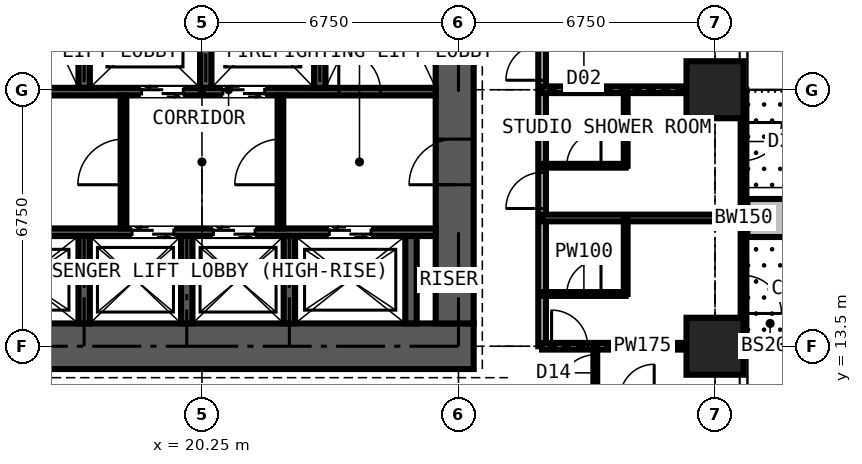
"""IFC4 building model, lengths in metres.
Left out: names, types, materials, properties, quantities, classifications, styles, units other than length and angle.
Written with IfcOpenShell. Run it as: python <this file> out.ifc"""

import sys

from ifc_helpers import new_model, si_unit, direction, frame, frame_2d, origin, origin_2d, place, context, subcontext, project, spatial, rectangle, extrude, element, fill, save


model = new_model("IFC4")
c1 = context("Model", 3, precision=1e-05, world=origin(), true_north=direction((0.0, 1.0)))
c2 = subcontext(c1, "Body", "Model", "MODEL_VIEW")
j1 = project(units=[si_unit("LENGTHUNIT", "METRE"), si_unit("PLANEANGLEUNIT", "RADIAN")], contexts=[c1])
p1 = place(None, origin())
s1 = spatial("IfcSite", under=j1, at=p1, CompositionType="ELEMENT")
p2 = place(p1, origin())
s2 = spatial("IfcBuilding", under=s1, at=p2, CompositionType="ELEMENT")
p3 = place(p2, frame((0.0, 0.0, 163.8)))
s3 = spatial("IfcBuildingStorey", under=s2, at=p3, CompositionType="ELEMENT", Elevation=163.8)
for number, where, z_axis, x_axis in (
    (1, (33.75, 13.5, 0.0), (0.0, 0.0, 1.0), (1.0, 0.0, 0.0)),
    (2, (33.75, 20.25, 0.0), (0.0, 0.0, 1.0), (1.0, 0.0, 0.0)),
):
    element("IfcColumn", number, at=place(p3, frame(where, z_axis=z_axis, x_axis=x_axis)), inside=s3, PredefinedType="COLUMN", context=c2, shape_type="SweptSolid", body=[
        extrude(rectangle(XDim=1.5, YDim=1.5, at=origin_2d()), origin(), (0.0, 0.0, 1.0), 3.6),
    ])
p4 = place(p3, frame((13.1, 13.5, 0.0), z_axis=(0.0, 0.0, 1.0), x_axis=(1.0, 0.0, 0.0)))
e3 = element("IfcWall", 3, at=p4, inside=s3, PredefinedType="SHEAR", context=c2, shape_type="SweptSolid", body=[
    extrude(rectangle(XDim=14.3, YDim=1.2, at=frame_2d((7.15, 0.0))), origin(), (0.0, 0.0, 1.0), 3.6),
])
p5 = place(p3, frame((26.9, 14.1, 0.0), z_axis=(0.0, 0.0, 1.0), x_axis=(0.0, 1.0, 0.0)))
e4 = element("IfcWall", 4, at=p5, inside=s3, PredefinedType="SHEAR", context=c2, shape_type="SweptSolid", body=[
    extrude(rectangle(XDim=12.3, YDim=1.0, at=frame_2d((6.15, 0.0))), origin(), (0.0, 0.0, 1.0), 3.6),
])
p6 = place(p5, frame((3.65, 0.0, 0.0)))
e5 = element("IfcOpeningElement", 5, at=p6, cuts=e4, PredefinedType="OPENING", context=c2, shape_type="SweptSolid", body=[
    extrude(rectangle(XDim=1.2, YDim=2.2, at=frame_2d((0.6, 1.1))), frame((0.0, 0.51, 0.0), z_axis=(0.0, -1.0, 0.0), x_axis=(1.0, 0.0, 0.0)), (0.0, 0.0, 1.0), 1.02),
])
p7 = place(p3, frame((34.5, 20.25, 0.0), z_axis=(0.0, 0.0, 1.0), x_axis=(0.0, -1.0, 0.0)))
e6 = element("IfcWall", 6, at=p7, inside=s3, PredefinedType="SOLIDWALL", context=c2, shape_type="SweptSolid", body=[
    extrude(rectangle(XDim=6.75, YDim=0.15, at=frame_2d((3.375, 0.0))), origin(), (0.0, 0.0, 1.0), 3.375),
])
p8 = place(p7, frame((0.863, 0.0, 0.0)))
e7 = element("IfcOpeningElement", 7, at=p8, cuts=e6, PredefinedType="OPENING", context=c2, shape_type="SweptSolid", body=[
    extrude(rectangle(XDim=1.0, YDim=2.2, at=frame_2d((0.5, 1.1))), frame((0.0, 0.085, 0.0), z_axis=(0.0, -1.0, 0.0), x_axis=(1.0, 0.0, 0.0)), (0.0, 0.0, 1.0), 0.17),
])
p9 = place(p7, frame((1.975, 0.0, 0.9)))
e8 = element("IfcOpeningElement", 8, at=p9, cuts=e6, PredefinedType="OPENING", context=c2, shape_type="SweptSolid", body=[
    extrude(rectangle(XDim=1.2, YDim=1.8, at=frame_2d((0.6, 0.9))), frame((0.0, 0.085, 0.0), z_axis=(0.0, -1.0, 0.0), x_axis=(1.0, 0.0, 0.0)), (0.0, 0.0, 1.0), 0.17),
])
p10 = place(p7, frame((4.887, 0.0, 0.0)))
e9 = element("IfcOpeningElement", 9, at=p10, cuts=e6, PredefinedType="OPENING", context=c2, shape_type="SweptSolid", body=[
    extrude(rectangle(XDim=1.0, YDim=2.2, at=frame_2d((0.5, 1.1))), frame((0.0, 0.085, 0.0), z_axis=(0.0, -1.0, 0.0), x_axis=(1.0, 0.0, 0.0)), (0.0, 0.0, 1.0), 0.17),
])
p11 = place(p7, frame((3.575, 0.0, 0.9)))
e10 = element("IfcOpeningElement", 10, at=p11, cuts=e6, PredefinedType="OPENING", context=c2, shape_type="SweptSolid", body=[
    extrude(rectangle(XDim=1.2, YDim=1.8, at=frame_2d((0.6, 0.9))), frame((0.0, 0.085, 0.0), z_axis=(0.0, -1.0, 0.0), x_axis=(1.0, 0.0, 0.0)), (0.0, 0.0, 1.0), 0.17),
])
p12 = place(p3, frame((34.6, 16.875, 0.0), z_axis=(0.0, 0.0, 1.0), x_axis=(1.0, 0.0, 0.0)))
e11 = element("IfcWall", 11, at=p12, inside=s3, PredefinedType="USERDEFINED", context=c2, shape_type="SweptSolid", body=[
    extrude(rectangle(XDim=2.2, YDim=1.0, at=frame_2d((1.1, 0.0))), origin(), (0.0, 0.0, 1.0), 0.9),
])
p13 = place(p3, frame((14.1, 16.5, 0.0), z_axis=(0.0, 0.0, 1.0), x_axis=(1.0, 0.0, 0.0)))
e12 = element("IfcWall", 12, at=p13, inside=s3, PredefinedType="SHEAR", context=c2, shape_type="SweptSolid", body=[
    extrude(rectangle(XDim=12.3, YDim=0.2, at=frame_2d((6.15, 0.0))), origin(), (0.0, 0.0, 1.0), 3.6),
])
p14 = place(p13, frame((0.9, 0.0, 0.0)))
e13 = element("IfcOpeningElement", 13, at=p14, cuts=e12, PredefinedType="OPENING", context=c2, shape_type="SweptSolid", body=[
    extrude(rectangle(XDim=1.1, YDim=2.2, at=frame_2d((0.55, 1.1))), frame((0.0, 0.11, 0.0), z_axis=(0.0, -1.0, 0.0), x_axis=(1.0, 0.0, 0.0)), (0.0, 0.0, 1.0), 0.22),
])
p15 = place(p13, frame((4.31, 0.0, 0.0)))
e14 = element("IfcOpeningElement", 14, at=p15, cuts=e12, PredefinedType="OPENING", context=c2, shape_type="SweptSolid", body=[
    extrude(rectangle(XDim=1.1, YDim=2.2, at=frame_2d((0.55, 1.1))), frame((0.0, 0.11, 0.0), z_axis=(0.0, -1.0, 0.0), x_axis=(1.0, 0.0, 0.0)), (0.0, 0.0, 1.0), 0.22),
])
p16 = place(p13, frame((6.45, 0.0, 0.0)))
e15 = element("IfcOpeningElement", 15, at=p16, cuts=e12, PredefinedType="OPENING", context=c2, shape_type="SweptSolid", body=[
    extrude(rectangle(XDim=1.1, YDim=2.2, at=frame_2d((0.55, 1.1))), frame((0.0, 0.11, 0.0), z_axis=(0.0, -1.0, 0.0), x_axis=(1.0, 0.0, 0.0)), (0.0, 0.0, 1.0), 0.22),
])
p17 = place(p13, frame((9.5, 0.0, 0.0)))
e16 = element("IfcOpeningElement", 16, at=p17, cuts=e12, PredefinedType="OPENING", context=c2, shape_type="SweptSolid", body=[
    extrude(rectangle(XDim=1.1, YDim=2.2, at=frame_2d((0.55, 1.1))), frame((0.0, 0.11, 0.0), z_axis=(0.0, -1.0, 0.0), x_axis=(1.0, 0.0, 0.0)), (0.0, 0.0, 1.0), 0.22),
])
p18 = place(p3, frame((14.1, 20.2, 0.0), z_axis=(0.0, 0.0, 1.0), x_axis=(1.0, 0.0, 0.0)))
e17 = element("IfcWall", 17, at=p18, inside=s3, PredefinedType="SHEAR", context=c2, shape_type="SweptSolid", body=[
    extrude(rectangle(XDim=12.3, YDim=0.2, at=frame_2d((6.15, 0.0))), origin(), (0.0, 0.0, 1.0), 3.6),
])
p19 = place(p18, frame((4.56, 0.0, 0.0)))
e18 = element("IfcOpeningElement", 18, at=p19, cuts=e17, PredefinedType="OPENING", context=c2, shape_type="SweptSolid", body=[
    extrude(rectangle(XDim=1.1, YDim=2.2, at=frame_2d((0.55, 1.1))), frame((0.0, 0.11, 0.0), z_axis=(0.0, -1.0, 0.0), x_axis=(1.0, 0.0, 0.0)), (0.0, 0.0, 1.0), 0.22),
])
p20 = place(p18, frame((6.7, 0.0, 0.0)))
e19 = element("IfcOpeningElement", 19, at=p20, cuts=e17, PredefinedType="OPENING", context=c2, shape_type="SweptSolid", body=[
    extrude(rectangle(XDim=1.1, YDim=2.2, at=frame_2d((0.55, 1.1))), frame((0.0, 0.11, 0.0), z_axis=(0.0, -1.0, 0.0), x_axis=(1.0, 0.0, 0.0)), (0.0, 0.0, 1.0), 0.22),
])
p21 = place(p18, frame((0.35, 0.0, 0.0)))
e20 = element("IfcOpeningElement", 20, at=p21, cuts=e17, PredefinedType="OPENING", context=c2, shape_type="SweptSolid", body=[
    extrude(rectangle(XDim=1.1, YDim=2.2, at=frame_2d((0.55, 1.1))), frame((0.0, 0.11, 0.0), z_axis=(0.0, -1.0, 0.0), x_axis=(1.0, 0.0, 0.0)), (0.0, 0.0, 1.0), 0.22),
])
p22 = place(p18, frame((9.75, 0.0, 0.0)))
e21 = element("IfcOpeningElement", 21, at=p22, cuts=e17, PredefinedType="OPENING", context=c2, shape_type="SweptSolid", body=[
    extrude(rectangle(XDim=1.1, YDim=2.2, at=frame_2d((0.55, 1.1))), frame((0.0, 0.11, 0.0), z_axis=(0.0, -1.0, 0.0), x_axis=(1.0, 0.0, 0.0)), (0.0, 0.0, 1.0), 0.22),
])
for number, where, z_axis, x_axis in (
    (22, (17.15, 20.3, 0.0), (0.0, 0.0, 1.0), (0.0, 1.0, 0.0)),
    (23, (23.35, 20.3, 0.0), (0.0, 0.0, 1.0), (0.0, 1.0, 0.0)),
):
    element("IfcWall", number, at=place(p3, frame(where, z_axis=z_axis, x_axis=x_axis)), inside=s3, PredefinedType="SHEAR", context=c2, shape_type="SweptSolid", body=[
        extrude(rectangle(XDim=6.1, YDim=0.3, at=frame_2d((3.05, 0.0))), origin(), (0.0, 0.0, 1.0), 3.6),
    ])
p23 = place(p3, frame((20.35, 20.3, 0.0), z_axis=(0.0, 0.0, 1.0), x_axis=(0.0, 1.0, 0.0)))
e24 = element("IfcWall", 24, at=p23, inside=s3, PredefinedType="SHEAR", context=c2, shape_type="SweptSolid", body=[
    extrude(rectangle(XDim=2.8, YDim=0.3, at=frame_2d((1.4, 0.0))), origin(), (0.0, 0.0, 1.0), 3.6),
])
for number, where, z_axis, x_axis in (
    (25, (17.15, 14.1, 0.0), (0.0, 0.0, 1.0), (0.0, 1.0, 0.0)),
    (26, (19.85, 14.1, 0.0), (0.0, 0.0, 1.0), (0.0, 1.0, 0.0)),
    (27, (22.55, 14.1, 0.0), (0.0, 0.0, 1.0), (0.0, 1.0, 0.0)),
    (28, (25.75, 14.1, 0.0), (0.0, 0.0, 1.0), (0.0, 1.0, 0.0)),
):
    element("IfcWall", number, at=place(p3, frame(where, z_axis=z_axis, x_axis=x_axis)), inside=s3, PredefinedType="SHEAR", context=c2, shape_type="SweptSolid", body=[
        extrude(rectangle(XDim=2.3, YDim=0.3, at=frame_2d((1.15, 0.0))), origin(), (0.0, 0.0, 1.0), 3.6),
    ])
p24 = place(p3, frame((18.185, 16.6, 0.0), z_axis=(0.0, 0.0, 1.0), x_axis=(0.0, 1.0, 0.0)))
e29 = element("IfcWall", 29, at=p24, inside=s3, PredefinedType="PARTITIONING", context=c2, shape_type="SweptSolid", body=[
    extrude(rectangle(XDim=3.5, YDim=0.15, at=frame_2d((1.75, 0.0))), origin(), (0.0, 0.0, 1.0), 3.375),
])
p25 = place(p24, frame((1.15, 0.0, 0.0)))
e30 = element("IfcOpeningElement", 30, at=p25, cuts=e29, PredefinedType="OPENING", context=c2, shape_type="SweptSolid", body=[
    extrude(rectangle(XDim=1.2, YDim=2.2, at=frame_2d((0.6, 1.1))), frame((0.0, 0.085, 0.0), z_axis=(0.0, -1.0, 0.0), x_axis=(1.0, 0.0, 0.0)), (0.0, 0.0, 1.0), 0.17),
])
p26 = place(p3, frame((22.315, 16.6, 0.0), z_axis=(0.0, 0.0, 1.0), x_axis=(0.0, 1.0, 0.0)))
e31 = element("IfcWall", 31, at=p26, inside=s3, PredefinedType="PARTITIONING", context=c2, shape_type="SweptSolid", body=[
    extrude(rectangle(XDim=3.5, YDim=0.15, at=frame_2d((1.75, 0.0))), origin(), (0.0, 0.0, 1.0), 3.375),
])
p27 = place(p26, frame((1.15, 0.0, 0.0)))
e32 = element("IfcOpeningElement", 32, at=p27, cuts=e31, PredefinedType="OPENING", context=c2, shape_type="SweptSolid", body=[
    extrude(rectangle(XDim=1.2, YDim=2.2, at=frame_2d((0.6, 1.1))), frame((0.0, 0.085, 0.0), z_axis=(0.0, -1.0, 0.0), x_axis=(1.0, 0.0, 0.0)), (0.0, 0.0, 1.0), 0.17),
])
p28 = place(p3, frame((29.2, 13.5, 0.0), z_axis=(0.0, 0.0, 1.0), x_axis=(0.0, 1.0, 0.0)))
e33 = element("IfcWall", 33, at=p28, inside=s3, PredefinedType="PARTITIONING", context=c2, shape_type="SweptSolid", body=[
    extrude(rectangle(XDim=15.7, YDim=0.2, at=frame_2d((7.85, 0.0))), origin(), (0.0, 0.0, 1.0), 3.375),
])
p29 = place(p28, frame((3.625, 0.0, 0.0)))
e34 = element("IfcOpeningElement", 34, at=p29, cuts=e33, PredefinedType="OPENING", context=c2, shape_type="SweptSolid", body=[
    extrude(rectangle(XDim=0.95, YDim=2.2, at=frame_2d((0.475, 1.1))), frame((0.0, 0.11, 0.0), z_axis=(0.0, -1.0, 0.0), x_axis=(1.0, 0.0, 0.0)), (0.0, 0.0, 1.0), 0.22),
])
p30 = place(p28, frame((7.0, 0.0, 0.0)))
e35 = element("IfcOpeningElement", 35, at=p30, cuts=e33, PredefinedType="OPENING", context=c2, shape_type="SweptSolid", body=[
    extrude(rectangle(XDim=0.95, YDim=2.2, at=frame_2d((0.475, 1.1))), frame((0.0, 0.11, 0.0), z_axis=(0.0, -1.0, 0.0), x_axis=(1.0, 0.0, 0.0)), (0.0, 0.0, 1.0), 0.22),
])
p31 = place(p28, frame((10.375, 0.0, 0.0)))
e36 = element("IfcOpeningElement", 36, at=p31, cuts=e33, PredefinedType="OPENING", context=c2, shape_type="SweptSolid", body=[
    extrude(rectangle(XDim=0.95, YDim=2.2, at=frame_2d((0.475, 1.1))), frame((0.0, 0.11, 0.0), z_axis=(0.0, -1.0, 0.0), x_axis=(1.0, 0.0, 0.0)), (0.0, 0.0, 1.0), 0.22),
])
p32 = place(p28, frame((14.1, 0.0, 0.0)))
e37 = element("IfcOpeningElement", 37, at=p32, cuts=e33, PredefinedType="OPENING", context=c2, shape_type="SweptSolid", body=[
    extrude(rectangle(XDim=1.0, YDim=2.2, at=frame_2d((0.5, 1.1))), frame((0.0, 0.11, 0.0), z_axis=(0.0, -1.0, 0.0), x_axis=(1.0, 0.0, 0.0)), (0.0, 0.0, 1.0), 0.22),
])
p33 = place(p3, frame((29.2, 13.5, 0.0), z_axis=(0.0, 0.0, 1.0), x_axis=(1.0, 0.0, 0.0)))
e38 = element("IfcWall", 38, at=p33, inside=s3, PredefinedType="PARTITIONING", context=c2, shape_type="SweptSolid", body=[
    extrude(rectangle(XDim=5.284, YDim=0.175, at=frame_2d((2.642, 0.0))), origin(), (0.0, 0.0, 1.0), 2.806),
])
p34 = place(p33, frame((0.25, 0.0, 0.0)))
e39 = element("IfcOpeningElement", 39, at=p34, cuts=e38, PredefinedType="OPENING", context=c2, shape_type="SweptSolid", body=[
    extrude(rectangle(XDim=0.95, YDim=2.2, at=frame_2d((0.475, 1.1))), frame((0.0, 0.097, 0.0), z_axis=(0.0, -1.0, 0.0), x_axis=(1.0, 0.0, 0.0)), (0.0, 0.0, 1.0), 0.195),
])
p35 = place(p3, frame((29.2, 14.875, 0.0), z_axis=(0.0, 0.0, 1.0), x_axis=(1.0, 0.0, 0.0)))
e40 = element("IfcWall", 40, at=p35, inside=s3, PredefinedType="PARTITIONING", context=c2, shape_type="SweptSolid", body=[
    extrude(rectangle(XDim=2.2, YDim=0.1, at=frame_2d((1.1, 0.0))), origin(), (0.0, 0.0, 1.0), 3.375),
])
p36 = place(p35, frame((0.65, 0.0, 0.0)))
e41 = element("IfcOpeningElement", 41, at=p36, cuts=e40, PredefinedType="OPENING", context=c2, shape_type="SweptSolid", body=[
    extrude(rectangle(XDim=0.9, YDim=2.2, at=frame_2d((0.45, 1.1))), frame((0.0, 0.06, 0.0), z_axis=(0.0, -1.0, 0.0), x_axis=(1.0, 0.0, 0.0)), (0.0, 0.0, 1.0), 0.12),
])
p37 = place(p3, frame((29.2, 16.875, 0.0), z_axis=(0.0, 0.0, 1.0), x_axis=(1.0, 0.0, 0.0)))
e42 = element("IfcWall", 42, at=p37, inside=s3, PredefinedType="PARTITIONING", context=c2, shape_type="SweptSolid", body=[
    extrude(rectangle(XDim=5.284, YDim=0.175, at=frame_2d((2.642, 0.0))), origin(), (0.0, 0.0, 1.0), 3.375),
])
p38 = place(p3, frame((29.2, 18.25, 0.0), z_axis=(0.0, 0.0, 1.0), x_axis=(1.0, 0.0, 0.0)))
e43 = element("IfcWall", 43, at=p38, inside=s3, PredefinedType="PARTITIONING", context=c2, shape_type="SweptSolid", body=[
    extrude(rectangle(XDim=2.2, YDim=0.1, at=frame_2d((1.1, 0.0))), origin(), (0.0, 0.0, 1.0), 3.375),
])
p39 = place(p38, frame((0.65, 0.0, 0.0)))
e44 = element("IfcOpeningElement", 44, at=p39, cuts=e43, PredefinedType="OPENING", context=c2, shape_type="SweptSolid", body=[
    extrude(rectangle(XDim=0.9, YDim=2.2, at=frame_2d((0.45, 1.1))), frame((0.0, 0.06, 0.0), z_axis=(0.0, -1.0, 0.0), x_axis=(1.0, 0.0, 0.0)), (0.0, 0.0, 1.0), 0.12),
])
p40 = place(p3, frame((29.2, 20.25, 0.0), z_axis=(0.0, 0.0, 1.0), x_axis=(1.0, 0.0, 0.0)))
e45 = element("IfcWall", 45, at=p40, inside=s3, PredefinedType="PARTITIONING", context=c2, shape_type="SweptSolid", body=[
    extrude(rectangle(XDim=5.284, YDim=0.175, at=frame_2d((2.642, 0.0))), origin(), (0.0, 0.0, 1.0), 2.806),
])
p41 = place(p3, frame((30.6, 10.125, 0.0), z_axis=(0.0, 0.0, 1.0), x_axis=(0.0, 1.0, 0.0)))
e46 = element("IfcWall", 46, at=p41, inside=s3, PredefinedType="PARTITIONING", context=c2, shape_type="SweptSolid", body=[
    extrude(rectangle(XDim=3.375, YDim=0.1, at=frame_2d((1.688, 0.0))), origin(), (0.0, 0.0, 1.0), 3.375),
])
p42 = place(p41, frame((2.2, 0.0, 0.0)))
e47 = element("IfcOpeningElement", 47, at=p42, cuts=e46, PredefinedType="OPENING", context=c2, shape_type="SweptSolid", body=[
    extrude(rectangle(XDim=0.95, YDim=2.2, at=frame_2d((0.475, 1.1))), frame((0.0, 0.06, 0.0), z_axis=(0.0, -1.0, 0.0), x_axis=(1.0, 0.0, 0.0)), (0.0, 0.0, 1.0), 0.12),
])
for number, where, z_axis, x_axis in (
    (48, (31.4, 14.875, 0.0), (0.0, 0.0, 1.0), (0.0, 1.0, 0.0)),
    (49, (31.4, 18.25, 0.0), (0.0, 0.0, 1.0), (0.0, 1.0, 0.0)),
):
    element("IfcWall", number, at=place(p3, frame(where, z_axis=z_axis, x_axis=x_axis)), inside=s3, PredefinedType="PARTITIONING", context=c2, shape_type="SweptSolid", body=[
        extrude(rectangle(XDim=2.0, YDim=0.1, at=frame_2d((1.0, 0.0))), origin(), (0.0, 0.0, 1.0), 3.375),
    ])
p43 = place(p8, origin())
e50 = element("IfcDoor", 50, at=p43, inside=s3, OperationType="SINGLE_SWING_LEFT", PredefinedType="DOOR", context=c2, shape_type="SweptSolid", body=[
    extrude(rectangle(XDim=1.0, YDim=2.2, at=frame_2d((0.5, 1.1))), frame((0.0, 0.025, 0.0), z_axis=(0.0, -1.0, 0.0), x_axis=(1.0, 0.0, 0.0)), (0.0, 0.0, 1.0), 0.05),
])
fill(e7, e50)
p44 = place(p9, origin())
e51 = element("IfcWindow", 51, at=p44, inside=s3, PartitioningType="SINGLE_PANEL", PredefinedType="WINDOW", context=c2, shape_type="SweptSolid", body=[
    extrude(rectangle(XDim=1.2, YDim=1.8, at=frame_2d((0.6, 0.9))), frame((0.0, 0.03, 0.0), z_axis=(0.0, -1.0, 0.0), x_axis=(1.0, 0.0, 0.0)), (0.0, 0.0, 1.0), 0.06),
])
fill(e8, e51)
p45 = place(p10, origin())
e52 = element("IfcDoor", 52, at=p45, inside=s3, OperationType="SINGLE_SWING_RIGHT", PredefinedType="DOOR", context=c2, shape_type="SweptSolid", body=[
    extrude(rectangle(XDim=1.0, YDim=2.2, at=frame_2d((0.5, 1.1))), frame((0.0, 0.025, 0.0), z_axis=(0.0, -1.0, 0.0), x_axis=(1.0, 0.0, 0.0)), (0.0, 0.0, 1.0), 0.05),
])
fill(e9, e52)
p46 = place(p11, origin())
e53 = element("IfcWindow", 53, at=p46, inside=s3, PartitioningType="SINGLE_PANEL", PredefinedType="WINDOW", context=c2, shape_type="SweptSolid", body=[
    extrude(rectangle(XDim=1.2, YDim=1.8, at=frame_2d((0.6, 0.9))), frame((0.0, 0.03, 0.0), z_axis=(0.0, -1.0, 0.0), x_axis=(1.0, 0.0, 0.0)), (0.0, 0.0, 1.0), 0.06),
])
fill(e10, e53)
p47 = place(p15, origin())
e54 = element("IfcDoor", 54, at=p47, inside=s3, OperationType="DOUBLE_DOOR_SLIDING", PredefinedType="DOOR", context=c2, shape_type="SweptSolid", body=[
    extrude(rectangle(XDim=1.1, YDim=2.2, at=frame_2d((0.55, 1.1))), frame((0.0, 0.025, 0.0), z_axis=(0.0, -1.0, 0.0), x_axis=(1.0, 0.0, 0.0)), (0.0, 0.0, 1.0), 0.05),
])
fill(e14, e54)
p48 = place(p16, origin())
e55 = element("IfcDoor", 55, at=p48, inside=s3, OperationType="DOUBLE_DOOR_SLIDING", PredefinedType="DOOR", context=c2, shape_type="SweptSolid", body=[
    extrude(rectangle(XDim=1.1, YDim=2.2, at=frame_2d((0.55, 1.1))), frame((0.0, 0.025, 0.0), z_axis=(0.0, -1.0, 0.0), x_axis=(1.0, 0.0, 0.0)), (0.0, 0.0, 1.0), 0.05),
])
fill(e15, e55)
p49 = place(p17, origin())
e56 = element("IfcDoor", 56, at=p49, inside=s3, OperationType="DOUBLE_DOOR_SLIDING", PredefinedType="DOOR", context=c2, shape_type="SweptSolid", body=[
    extrude(rectangle(XDim=1.1, YDim=2.2, at=frame_2d((0.55, 1.1))), frame((0.0, 0.025, 0.0), z_axis=(0.0, -1.0, 0.0), x_axis=(1.0, 0.0, 0.0)), (0.0, 0.0, 1.0), 0.05),
])
fill(e16, e56)
p50 = place(p19, origin())
e57 = element("IfcDoor", 57, at=p50, inside=s3, OperationType="DOUBLE_DOOR_SLIDING", PredefinedType="DOOR", context=c2, shape_type="SweptSolid", body=[
    extrude(rectangle(XDim=1.1, YDim=2.2, at=frame_2d((0.55, 1.1))), frame((0.0, 0.025, 0.0), z_axis=(0.0, -1.0, 0.0), x_axis=(1.0, 0.0, 0.0)), (0.0, 0.0, 1.0), 0.05),
])
fill(e18, e57)
p51 = place(p20, origin())
e58 = element("IfcDoor", 58, at=p51, inside=s3, OperationType="DOUBLE_DOOR_SLIDING", PredefinedType="DOOR", context=c2, shape_type="SweptSolid", body=[
    extrude(rectangle(XDim=1.1, YDim=2.2, at=frame_2d((0.55, 1.1))), frame((0.0, 0.025, 0.0), z_axis=(0.0, -1.0, 0.0), x_axis=(1.0, 0.0, 0.0)), (0.0, 0.0, 1.0), 0.05),
])
fill(e19, e58)
p52 = place(p6, origin())
e59 = element("IfcDoor", 59, at=p52, inside=s3, OperationType="DOUBLE_DOOR_SINGLE_SWING", PredefinedType="DOOR", context=c2, shape_type="SweptSolid", body=[
    extrude(rectangle(XDim=1.2, YDim=2.2, at=frame_2d((0.6, 1.1))), frame((0.0, 0.025, 0.0), z_axis=(0.0, -1.0, 0.0), x_axis=(1.0, 0.0, 0.0)), (0.0, 0.0, 1.0), 0.05),
])
fill(e5, e59)
p53 = place(p25, origin())
e60 = element("IfcDoor", 60, at=p53, inside=s3, OperationType="DOUBLE_DOOR_SINGLE_SWING", PredefinedType="DOOR", context=c2, shape_type="SweptSolid", body=[
    extrude(rectangle(XDim=1.2, YDim=2.2, at=frame_2d((0.6, 1.1))), frame((0.0, 0.025, 0.0), z_axis=(0.0, -1.0, 0.0), x_axis=(1.0, 0.0, 0.0)), (0.0, 0.0, 1.0), 0.05),
])
fill(e30, e60)
p54 = place(p27, origin())
e61 = element("IfcDoor", 61, at=p54, inside=s3, OperationType="DOUBLE_DOOR_SINGLE_SWING", PredefinedType="DOOR", context=c2, shape_type="SweptSolid", body=[
    extrude(rectangle(XDim=1.2, YDim=2.2, at=frame_2d((0.6, 1.1))), frame((0.0, 0.025, 0.0), z_axis=(0.0, -1.0, 0.0), x_axis=(1.0, 0.0, 0.0)), (0.0, 0.0, 1.0), 0.05),
])
fill(e32, e61)
p55 = place(p22, origin())
e62 = element("IfcDoor", 62, at=p55, inside=s3, OperationType="SINGLE_SWING_LEFT", PredefinedType="DOOR", context=c2, shape_type="SweptSolid", body=[
    extrude(rectangle(XDim=1.1, YDim=2.2, at=frame_2d((0.55, 1.1))), frame((0.0, 0.025, 0.0), z_axis=(0.0, -1.0, 0.0), x_axis=(1.0, 0.0, 0.0)), (0.0, 0.0, 1.0), 0.05),
])
fill(e21, e62)
p56 = place(p42, origin())
e63 = element("IfcDoor", 63, at=p56, inside=s3, OperationType="SINGLE_SWING_LEFT", PredefinedType="DOOR", context=c2, shape_type="SweptSolid", body=[
    extrude(rectangle(XDim=0.95, YDim=2.2, at=frame_2d((0.475, 1.1))), frame((0.0, 0.025, 0.0), z_axis=(0.0, -1.0, 0.0), x_axis=(1.0, 0.0, 0.0)), (0.0, 0.0, 1.0), 0.05),
])
fill(e47, e63)
p57 = place(p34, origin())
e64 = element("IfcDoor", 64, at=p57, inside=s3, OperationType="SINGLE_SWING_LEFT", PredefinedType="DOOR", context=c2, shape_type="SweptSolid", body=[
    extrude(rectangle(XDim=0.95, YDim=2.2, at=frame_2d((0.475, 1.1))), frame((0.0, 0.025, 0.0), z_axis=(0.0, -1.0, 0.0), x_axis=(1.0, 0.0, 0.0)), (0.0, 0.0, 1.0), 0.05),
])
fill(e39, e64)
p58 = place(p36, origin())
e65 = element("IfcDoor", 65, at=p58, inside=s3, OperationType="SINGLE_SWING_RIGHT", PredefinedType="DOOR", context=c2, shape_type="SweptSolid", body=[
    extrude(rectangle(XDim=0.9, YDim=2.2, at=frame_2d((0.45, 1.1))), frame((0.0, 0.025, 0.0), z_axis=(0.0, -1.0, 0.0), x_axis=(1.0, 0.0, 0.0)), (0.0, 0.0, 1.0), 0.05),
])
fill(e41, e65)
p59 = place(p29, origin())
e66 = element("IfcDoor", 66, at=p59, inside=s3, OperationType="SINGLE_SWING_LEFT", PredefinedType="DOOR", context=c2, shape_type="SweptSolid", body=[
    extrude(rectangle(XDim=0.95, YDim=2.2, at=frame_2d((0.475, 1.1))), frame((0.0, 0.025, 0.0), z_axis=(0.0, -1.0, 0.0), x_axis=(1.0, 0.0, 0.0)), (0.0, 0.0, 1.0), 0.05),
])
fill(e34, e66)
p60 = place(p39, origin())
e67 = element("IfcDoor", 67, at=p60, inside=s3, OperationType="SINGLE_SWING_RIGHT", PredefinedType="DOOR", context=c2, shape_type="SweptSolid", body=[
    extrude(rectangle(XDim=0.9, YDim=2.2, at=frame_2d((0.45, 1.1))), frame((0.0, 0.025, 0.0), z_axis=(0.0, -1.0, 0.0), x_axis=(1.0, 0.0, 0.0)), (0.0, 0.0, 1.0), 0.05),
])
fill(e44, e67)
p61 = place(p30, origin())
e68 = element("IfcDoor", 68, at=p61, inside=s3, OperationType="SINGLE_SWING_LEFT", PredefinedType="DOOR", context=c2, shape_type="SweptSolid", body=[
    extrude(rectangle(XDim=0.95, YDim=2.2, at=frame_2d((0.475, 1.1))), frame((0.0, 0.025, 0.0), z_axis=(0.0, -1.0, 0.0), x_axis=(1.0, 0.0, 0.0)), (0.0, 0.0, 1.0), 0.05),
])
fill(e35, e68)
save(model, sys.argv[1])
